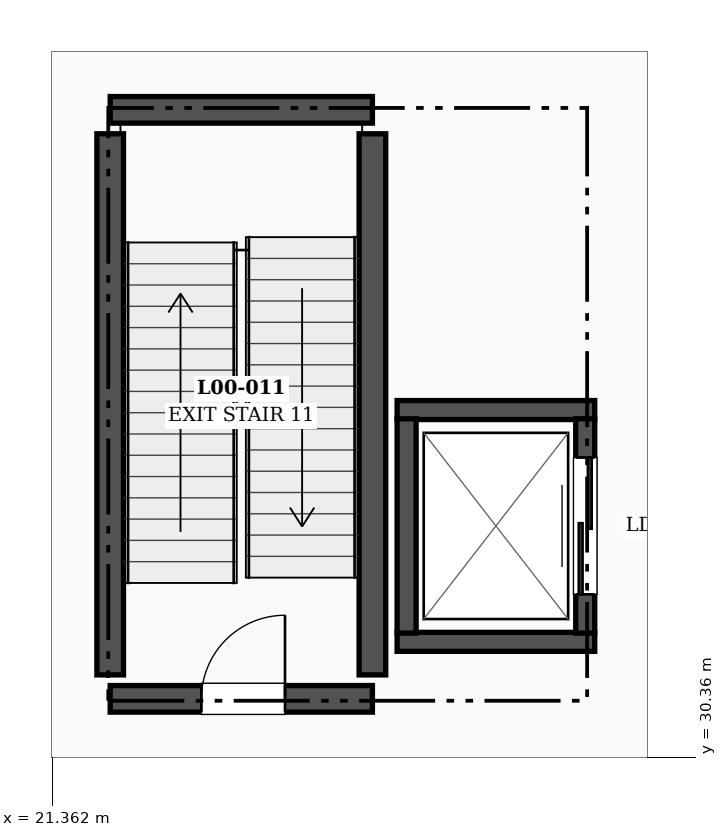
"""IFC4 building model, lengths in metres.
Left out: names, types, materials, properties, quantities, classifications, styles, units other than length and angle.
Written with IfcOpenShell. Run it as: python <this file> out.ifc"""

import sys

from ifc_helpers import new_model, si_unit, direction, frame, frame_2d, origin, place, context, subcontext, project, spatial, rectangle, extrude, element, fill, save


model = new_model("IFC4")
c1 = context("Model", 3, precision=1e-05, world=origin(), true_north=direction((0.0, 1.0)))
c2 = subcontext(c1, "Body", "Model", "MODEL_VIEW")
j1 = project(units=[si_unit("LENGTHUNIT", "METRE"), si_unit("PLANEANGLEUNIT", "RADIAN")], contexts=[c1])
p1 = place(None, origin())
s1 = spatial("IfcSite", under=j1, at=p1, CompositionType="ELEMENT")
p2 = place(p1, origin())
s2 = spatial("IfcBuilding", under=s1, at=p2, CompositionType="ELEMENT")
p3 = place(p2, origin())
s3 = spatial("IfcBuildingStorey", under=s2, at=p3, CompositionType="ELEMENT", Elevation=0.0)
p4 = place(p3, frame((22.125, 31.125, 0.0), z_axis=(0.0, 0.0, 1.0), x_axis=(1.0, 0.0, 0.0)))
e1 = element("IfcWall", 1, at=p4, inside=s3, PredefinedType="SHEAR", context=c2, shape_type="SweptSolid", body=[
    extrude(rectangle(XDim=3.45, YDim=0.35, at=frame_2d((1.725, 0.0))), origin(), (0.0, 0.0, 1.0), 6.0),
])
p5 = place(p4, frame((1.2, 0.0, 0.0)))
e2 = element("IfcOpeningElement", 2, at=p5, cuts=e1, PredefinedType="OPENING", context=c2, shape_type="SweptSolid", body=[
    extrude(rectangle(XDim=1.1, YDim=2.2, at=frame_2d((0.55, 1.1))), frame((0.0, 0.185, 0.0), z_axis=(0.0, -1.0, 0.0), x_axis=(1.0, 0.0, 0.0)), (0.0, 0.0, 1.0), 0.37),
])
p6 = place(p3, frame((22.125, 38.875, 0.0), z_axis=(0.0, 0.0, 1.0), x_axis=(1.0, 0.0, 0.0)))
e3 = element("IfcWall", 3, at=p6, inside=s3, PredefinedType="SHEAR", context=c2, shape_type="SweptSolid", body=[
    extrude(rectangle(XDim=3.45, YDim=0.35, at=frame_2d((1.725, 0.0))), origin(), (0.0, 0.0, 1.0), 6.0),
])
for number, where, z_axis, x_axis in (
    (4, (22.125, 31.44, 0.0), (0.0, 0.0, 1.0), (0.0, 1.0, 0.0)),
    (5, (25.575, 31.44, 0.0), (0.0, 0.0, 1.0), (0.0, 1.0, 0.0)),
):
    element("IfcWall", number, at=place(p3, frame(where, z_axis=z_axis, x_axis=x_axis)), inside=s3, PredefinedType="SHEAR", context=c2, shape_type="SweptSolid", body=[
        extrude(rectangle(XDim=7.12, YDim=0.35, at=frame_2d((3.56, 0.0))), origin(), (0.0, 0.0, 1.0), 6.0),
    ])
for number, where, z_axis, x_axis in (
    (6, (25.9, 31.875, 0.0), (0.0, 0.0, 1.0), (1.0, 0.0, 0.0)),
    (7, (25.9, 34.925, 0.0), (0.0, 0.0, 1.0), (1.0, 0.0, 0.0)),
):
    element("IfcWall", number, at=place(p3, frame(where, z_axis=z_axis, x_axis=x_axis)), inside=s3, PredefinedType="SHEAR", context=c2, shape_type="SweptSolid", body=[
        extrude(rectangle(XDim=2.6, YDim=0.25, at=frame_2d((1.3, 0.0))), origin(), (0.0, 0.0, 1.0), 6.0),
    ])
p7 = place(p3, frame((26.025, 31.99, 0.0), z_axis=(0.0, 0.0, 1.0), x_axis=(0.0, 1.0, 0.0)))
e8 = element("IfcWall", 8, at=p7, inside=s3, PredefinedType="SHEAR", context=c2, shape_type="SweptSolid", body=[
    extrude(rectangle(XDim=2.82, YDim=0.25, at=frame_2d((1.41, 0.0))), origin(), (0.0, 0.0, 1.0), 6.0),
])
p8 = place(p3, frame((28.375, 31.99, 0.0), z_axis=(0.0, 0.0, 1.0), x_axis=(0.0, 1.0, 0.0)))
e9 = element("IfcWall", 9, at=p8, inside=s3, PredefinedType="SHEAR", context=c2, shape_type="SweptSolid", body=[
    extrude(rectangle(XDim=2.82, YDim=0.25, at=frame_2d((1.41, 0.0))), origin(), (0.0, 0.0, 1.0), 6.0),
])
p9 = place(p8, frame((0.51, 0.0, 0.0)))
e10 = element("IfcOpeningElement", 10, at=p9, cuts=e9, PredefinedType="OPENING", context=c2, shape_type="SweptSolid", body=[
    extrude(rectangle(XDim=1.8, YDim=2.4, at=frame_2d((0.9, 1.2))), frame((0.0, 0.135, 0.0), z_axis=(0.0, -1.0, 0.0), x_axis=(1.0, 0.0, 0.0)), (0.0, 0.0, 1.0), 0.27),
])
p10 = place(p5, origin())
e11 = element("IfcDoor", 11, at=p10, inside=s3, OperationType="SINGLE_SWING_RIGHT", PredefinedType="DOOR", context=c2, shape_type="SweptSolid", body=[
    extrude(rectangle(XDim=1.1, YDim=2.2, at=frame_2d((0.55, 1.1))), frame((0.0, 0.025, 0.0), z_axis=(0.0, -1.0, 0.0), x_axis=(1.0, 0.0, 0.0)), (0.0, 0.0, 1.0), 0.05),
])
fill(e2, e11)
p11 = place(p9, origin())
e12 = element("IfcDoor", 12, at=p11, inside=s3, OperationType="DOUBLE_DOOR_SLIDING", PredefinedType="DOOR", context=c2, shape_type="SweptSolid", body=[
    extrude(rectangle(XDim=1.8, YDim=2.4, at=frame_2d((0.9, 1.2))), frame((0.0, 0.025, 0.0), z_axis=(0.0, -1.0, 0.0), x_axis=(1.0, 0.0, 0.0)), (0.0, 0.0, 1.0), 0.05),
])
fill(e10, e12)
save(model, sys.argv[1])
